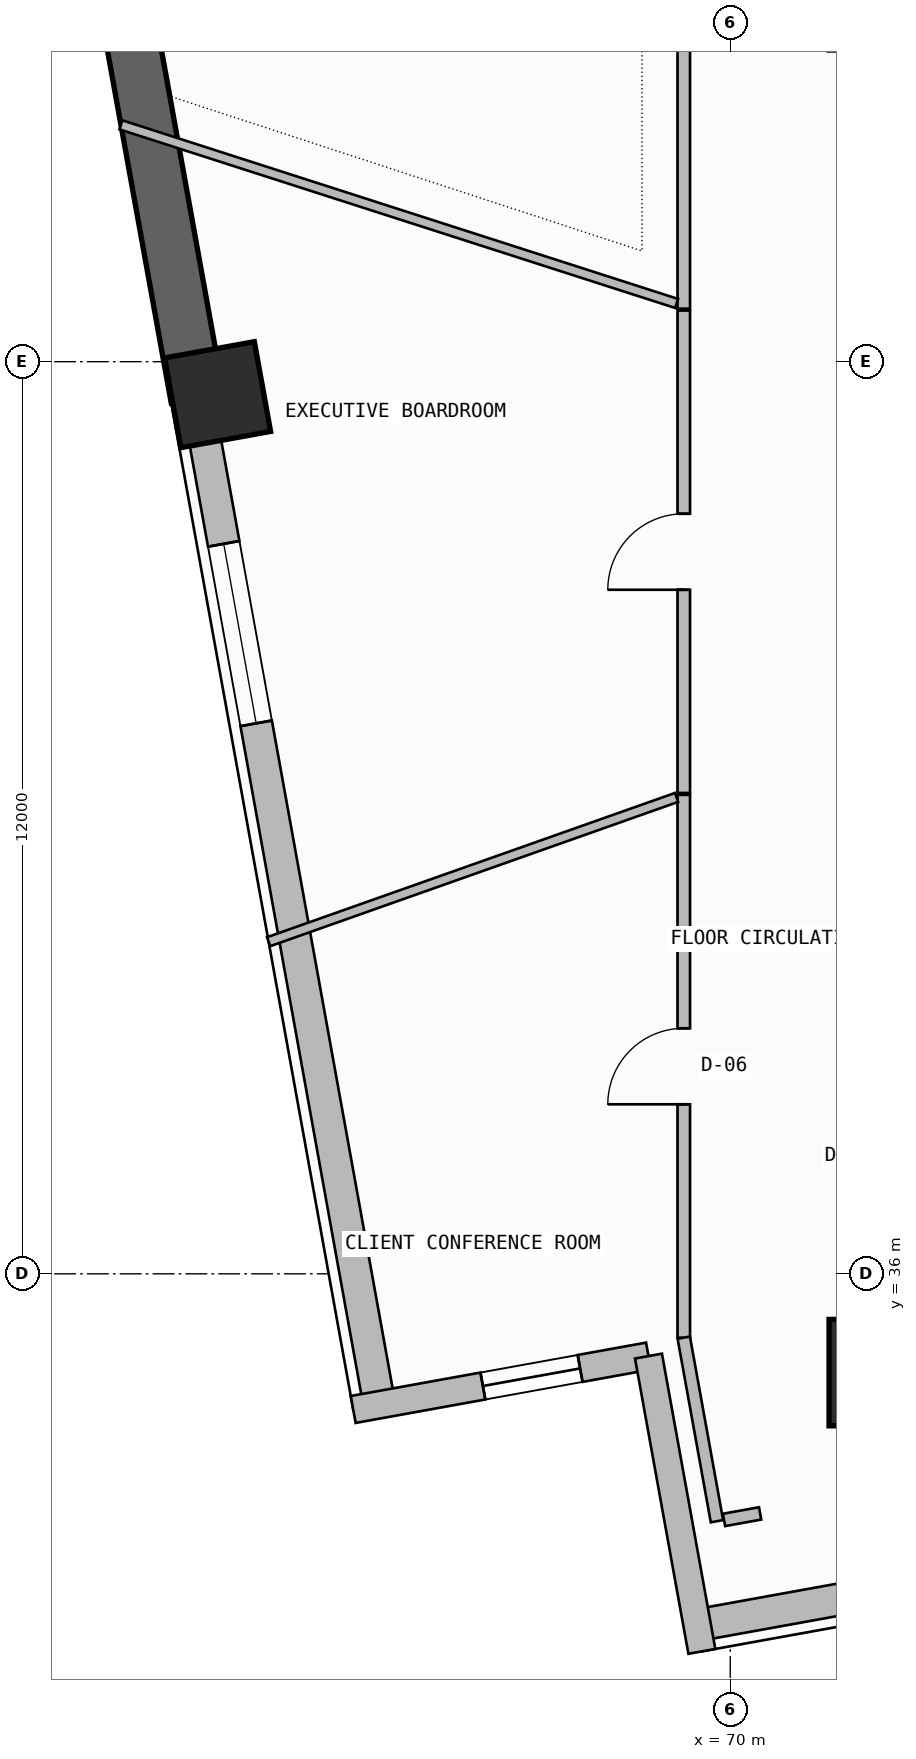
"""IFC4 building model, lengths in metres.
Left out: names, types, materials, properties, quantities, classifications, styles, units other than length and angle.
Written with IfcOpenShell. Run it as: python <this file> out.ifc"""

import sys

from ifc_helpers import new_model, si_unit, direction, frame, frame_2d, origin, origin_2d, place, context, subcontext, project, spatial, rectangle, extrude, element, fill, save


model = new_model("IFC4")
c1 = context("Model", 3, precision=1e-05, world=origin(), true_north=direction((0.0, 1.0)))
c2 = subcontext(c1, "Body", "Model", "MODEL_VIEW")
j1 = project(units=[si_unit("LENGTHUNIT", "METRE"), si_unit("PLANEANGLEUNIT", "RADIAN")], contexts=[c1])
p1 = place(None, origin())
s1 = spatial("IfcSite", under=j1, at=p1, CompositionType="ELEMENT")
p2 = place(p1, origin())
s2 = spatial("IfcBuilding", under=s1, at=p2, CompositionType="ELEMENT")
p3 = place(p2, frame((0.0, 0.0, 110.1)))
s3 = spatial("IfcBuildingStorey", under=s2, at=p3, CompositionType="ELEMENT", Elevation=110.1)
p4 = place(p3, frame((72.0, 34.7, 0.0), z_axis=(0.0, 0.0, 1.0), x_axis=(1.0, 0.0, 0.0)))
e1 = element("IfcColumn", 1, at=p4, inside=s3, PredefinedType="COLUMN", context=c2, shape_type="SweptSolid", body=[
    extrude(rectangle(XDim=1.4, YDim=1.4, at=origin_2d()), origin(), (0.0, 0.0, 1.0), 3.6),
])
p5 = place(p3, frame((63.255, 47.566, 0.0), z_axis=(0.0, 0.0, 1.0), x_axis=(-0.177943545474, 0.984040697646, 0.0)))
e2 = element("IfcColumn", 2, at=p5, inside=s3, PredefinedType="COLUMN", context=c2, shape_type="SweptSolid", body=[
    extrude(rectangle(XDim=1.2, YDim=1.2, at=origin_2d()), origin(), (0.0, 0.0, 1.0), 3.6),
])
p6 = place(p3, frame((69.565, 31.377, 0.0), z_axis=(0.0, 0.0, 1.0), x_axis=(0.98404091451, 0.177942346197, 0.0)))
e3 = element("IfcWall", 3, at=p6, inside=s3, PredefinedType="SOLIDWALL", context=c2, shape_type="SweptSolid", body=[
    extrude(rectangle(XDim=15.583, YDim=0.42, at=frame_2d((7.792, 0.0))), origin(), (0.0, 0.0, 1.0), 3.34),
])
p7 = place(p6, frame((10.5, 0.0, 1.2)))
e4 = element("IfcOpeningElement", 4, at=p7, cuts=e3, PredefinedType="OPENING", context=c2, shape_type="SweptSolid", body=[
    extrude(rectangle(XDim=2.4, YDim=0.9, at=frame_2d((1.2, 0.45))), frame((0.0, 0.22, 0.0), z_axis=(0.0, -1.0, 0.0), x_axis=(1.0, 0.0, 0.0)), (0.0, 0.0, 1.0), 0.44),
])
p8 = place(p3, frame((59.328, 67.768, -0.26), z_axis=(0.0, 0.0, 1.0), x_axis=(0.177933213615, -0.984042565895, 0.0)))
e5 = element("IfcWall", 5, at=p8, inside=s3, PredefinedType="SHEAR", context=c2, shape_type="SweptSolid", body=[
    extrude(rectangle(XDim=20.579, YDim=0.7, at=frame_2d((10.289, 0.0))), origin(), (0.0, 0.0, 1.0), 3.6),
])
p9 = place(p8, frame((9.1, 0.0, 1.2)))
e6 = element("IfcOpeningElement", 6, at=p9, cuts=e5, PredefinedType="OPENING", context=c2, shape_type="SweptSolid", body=[
    extrude(rectangle(XDim=2.4, YDim=0.9, at=frame_2d((1.2, 0.45))), frame((0.0, 0.36, 0.0), z_axis=(0.0, -1.0, 0.0), x_axis=(1.0, 0.0, 0.0)), (0.0, 0.0, 1.0), 0.72),
])
p10 = place(p3, frame((62.99, 47.518, 0.0), z_axis=(0.0, 0.0, 1.0), x_axis=(0.177948058674, -0.984039881516, 0.0)))
e7 = element("IfcWall", 7, at=p10, inside=s3, PredefinedType="SOLIDWALL", context=c2, shape_type="SweptSolid", body=[
    extrude(rectangle(XDim=13.455, YDim=0.42, at=frame_2d((6.728, 0.0))), origin(), (0.0, 0.0, 1.0), 2.725),
])
p11 = place(p10, frame((1.945, 0.0, 1.2)))
e8 = element("IfcOpeningElement", 8, at=p11, cuts=e7, PredefinedType="OPENING", context=c2, shape_type="SweptSolid", body=[
    extrude(rectangle(XDim=2.4, YDim=0.9, at=frame_2d((1.2, 0.45))), frame((0.0, 0.22, 0.0), z_axis=(0.0, -1.0, 0.0), x_axis=(1.0, 0.0, 0.0)), (0.0, 0.0, 1.0), 0.44),
])
p12 = place(p3, frame((65.039, 34.215, 0.0), z_axis=(0.0, 0.0, 1.0), x_axis=(0.984046535247, 0.177911260096, 0.0)))
e9 = element("IfcWall", 9, at=p12, inside=s3, PredefinedType="SOLIDWALL", context=c2, shape_type="SweptSolid", body=[
    extrude(rectangle(XDim=3.948, YDim=0.36, at=frame_2d((1.974, 0.0))), origin(), (0.0, 0.0, 1.0), 3.34),
])
p13 = place(p12, frame((1.734, 0.0, 0.45)))
e10 = element("IfcOpeningElement", 10, at=p13, cuts=e9, PredefinedType="OPENING", context=c2, shape_type="SweptSolid", body=[
    extrude(rectangle(XDim=1.3, YDim=2.4, at=frame_2d((0.65, 1.2))), frame((0.0, 0.19, 0.0), z_axis=(0.0, -1.0, 0.0), x_axis=(1.0, 0.0, 0.0)), (0.0, 0.0, 1.0), 0.38),
])
p14 = place(p3, frame((68.924, 34.917, 0.0), z_axis=(0.0, 0.0, 1.0), x_axis=(0.177981971326, -0.984033748346, 0.0)))
e11 = element("IfcWall", 11, at=p14, inside=s3, PredefinedType="SOLIDWALL", context=c2, shape_type="SweptSolid", body=[
    extrude(rectangle(XDim=3.948, YDim=0.36, at=frame_2d((1.974, 0.0))), origin(), (0.0, 0.0, 1.0), 3.34),
])
p15 = place(p3, frame((69.389, 42.301, 0.0), z_axis=(0.0, 0.0, 1.0), x_axis=(0.0, -1.0, 0.0)))
e12 = element("IfcWall", 12, at=p15, inside=s3, PredefinedType="PARTITIONING", context=c2, shape_type="SweptSolid", body=[
    extrude(rectangle(XDim=7.141, YDim=0.165, at=frame_2d((3.571, 0.0))), origin(), (0.0, 0.0, 1.0), 3.34),
])
p16 = place(p15, frame((3.071, 0.0, 0.0)))
e13 = element("IfcOpeningElement", 13, at=p16, cuts=e12, PredefinedType="OPENING", context=c2, shape_type="SweptSolid", body=[
    extrude(rectangle(XDim=1.0, YDim=2.2, at=frame_2d((0.5, 1.1))), frame((0.0, 0.093, 0.0), z_axis=(0.0, -1.0, 0.0), x_axis=(1.0, 0.0, 0.0)), (0.0, 0.0, 1.0), 0.185),
])
p17 = place(p3, frame((69.389, 35.16, 0.0), z_axis=(0.0, 0.0, 1.0), x_axis=(0.177808331927, -0.984065138645, 0.0)))
e14 = element("IfcWall", 14, at=p17, inside=s3, PredefinedType="PARTITIONING", context=c2, shape_type="SweptSolid", body=[
    extrude(rectangle(XDim=2.454, YDim=0.165, at=frame_2d((1.227, 0.0))), origin(), (0.0, 0.0, 1.0), 3.34),
])
p18 = place(p3, frame((69.918, 32.762, 0.0), z_axis=(0.0, 0.0, 1.0), x_axis=(0.984015288824, 0.178084000857, 0.0)))
e15 = element("IfcWall", 15, at=p18, inside=s3, PredefinedType="PARTITIONING", context=c2, shape_type="SweptSolid", body=[
    extrude(rectangle(XDim=0.483, YDim=0.165, at=frame_2d((0.241, 0.0))), origin(), (0.0, 0.0, 1.0), 3.34),
])
p19 = place(p3, frame((63.927, 40.369, 0.0), z_axis=(0.0, 0.0, 1.0), x_axis=(0.942798594797, 0.33336287983, 0.0)))
e16 = element("IfcWall", 16, at=p19, inside=s3, PredefinedType="PARTITIONING", context=c2, shape_type="SweptSolid", body=[
    extrude(rectangle(XDim=5.693, YDim=0.125, at=frame_2d((2.847, 0.0))), origin(), (0.0, 0.0, 1.0), 3.34),
])
p20 = place(p3, frame((69.389, 58.909, 0.0), z_axis=(0.0, 0.0, 1.0), x_axis=(0.0, -1.0, 0.0)))
e17 = element("IfcWall", 17, at=p20, inside=s3, PredefinedType="PARTITIONING", context=c2, shape_type="SweptSolid", body=[
    extrude(rectangle(XDim=10.211, YDim=0.165, at=frame_2d((5.105, 0.0))), origin(), (0.0, 0.0, 1.0), 2.725),
])
p21 = place(p20, frame((4.306, 0.0, 0.0)))
e18 = element("IfcOpeningElement", 18, at=p21, cuts=e17, PredefinedType="OPENING", context=c2, shape_type="SweptSolid", body=[
    extrude(rectangle(XDim=1.6, YDim=2.3, at=frame_2d((0.8, 1.15))), frame((0.0, 0.093, 0.0), z_axis=(0.0, -1.0, 0.0), x_axis=(1.0, 0.0, 0.0)), (0.0, 0.0, 1.0), 0.185),
])
p22 = place(p3, frame((69.294, 48.766, 0.0), z_axis=(0.0, 0.0, 1.0), x_axis=(-0.952039476867, 0.305975218747, 0.0)))
e19 = element("IfcWall", 19, at=p22, inside=s3, PredefinedType="PARTITIONING", context=c2, shape_type="SweptSolid", body=[
    extrude(rectangle(XDim=7.679, YDim=0.125, at=frame_2d((3.84, 0.0))), origin(), (0.0, 0.0, 1.0), 2.725),
])
p23 = place(p3, frame((69.389, 48.673, 0.0), z_axis=(0.0, 0.0, 1.0), x_axis=(0.0, -1.0, 0.0)))
e20 = element("IfcWall", 20, at=p23, inside=s3, PredefinedType="PARTITIONING", context=c2, shape_type="SweptSolid", body=[
    extrude(rectangle(XDim=6.346, YDim=0.165, at=frame_2d((3.173, 0.0))), origin(), (0.0, 0.0, 1.0), 3.34),
])
p24 = place(p23, frame((2.673, 0.0, 0.0)))
e21 = element("IfcOpeningElement", 21, at=p24, cuts=e20, PredefinedType="OPENING", context=c2, shape_type="SweptSolid", body=[
    extrude(rectangle(XDim=1.0, YDim=2.2, at=frame_2d((0.5, 1.1))), frame((0.0, 0.093, 0.0), z_axis=(0.0, -1.0, 0.0), x_axis=(1.0, 0.0, 0.0)), (0.0, 0.0, 1.0), 0.185),
])
p25 = place(p11, origin())
e22 = element("IfcWindow", 22, at=p25, inside=s3, PartitioningType="SINGLE_PANEL", PredefinedType="WINDOW", context=c2, shape_type="SweptSolid", body=[
    extrude(rectangle(XDim=2.4, YDim=0.9, at=frame_2d((1.2, 0.45))), frame((0.0, 0.03, 0.0), z_axis=(0.0, -1.0, 0.0), x_axis=(1.0, 0.0, 0.0)), (0.0, 0.0, 1.0), 0.06),
])
fill(e8, e22)
p26 = place(p13, origin())
e23 = element("IfcWindow", 23, at=p26, inside=s3, PartitioningType="SINGLE_PANEL", PredefinedType="WINDOW", context=c2, shape_type="SweptSolid", body=[
    extrude(rectangle(XDim=1.3, YDim=2.4, at=frame_2d((0.65, 1.2))), frame((0.0, 0.03, 0.0), z_axis=(0.0, -1.0, 0.0), x_axis=(1.0, 0.0, 0.0)), (0.0, 0.0, 1.0), 0.06),
])
fill(e10, e23)
p27 = place(p16, frame((1.0, 0.0, 0.0), z_axis=(0.0, 0.0, 1.0), x_axis=(-1.0, 0.0, 0.0)))
e24 = element("IfcDoor", 24, at=p27, inside=s3, OperationType="SINGLE_SWING_LEFT", PredefinedType="DOOR", context=c2, shape_type="SweptSolid", body=[
    extrude(rectangle(XDim=1.0, YDim=2.2, at=frame_2d((0.5, 1.1))), frame((0.0, 0.025, 0.0), z_axis=(0.0, -1.0, 0.0), x_axis=(1.0, 0.0, 0.0)), (0.0, 0.0, 1.0), 0.05),
])
fill(e13, e24)
p28 = place(p24, frame((1.0, 0.0, 0.0), z_axis=(0.0, 0.0, 1.0), x_axis=(-1.0, 0.0, 0.0)))
e25 = element("IfcDoor", 25, at=p28, inside=s3, OperationType="SINGLE_SWING_LEFT", PredefinedType="DOOR", context=c2, shape_type="SweptSolid", body=[
    extrude(rectangle(XDim=1.0, YDim=2.2, at=frame_2d((0.5, 1.1))), frame((0.0, 0.025, 0.0), z_axis=(0.0, -1.0, 0.0), x_axis=(1.0, 0.0, 0.0)), (0.0, 0.0, 1.0), 0.05),
])
fill(e21, e25)
save(model, sys.argv[1])
